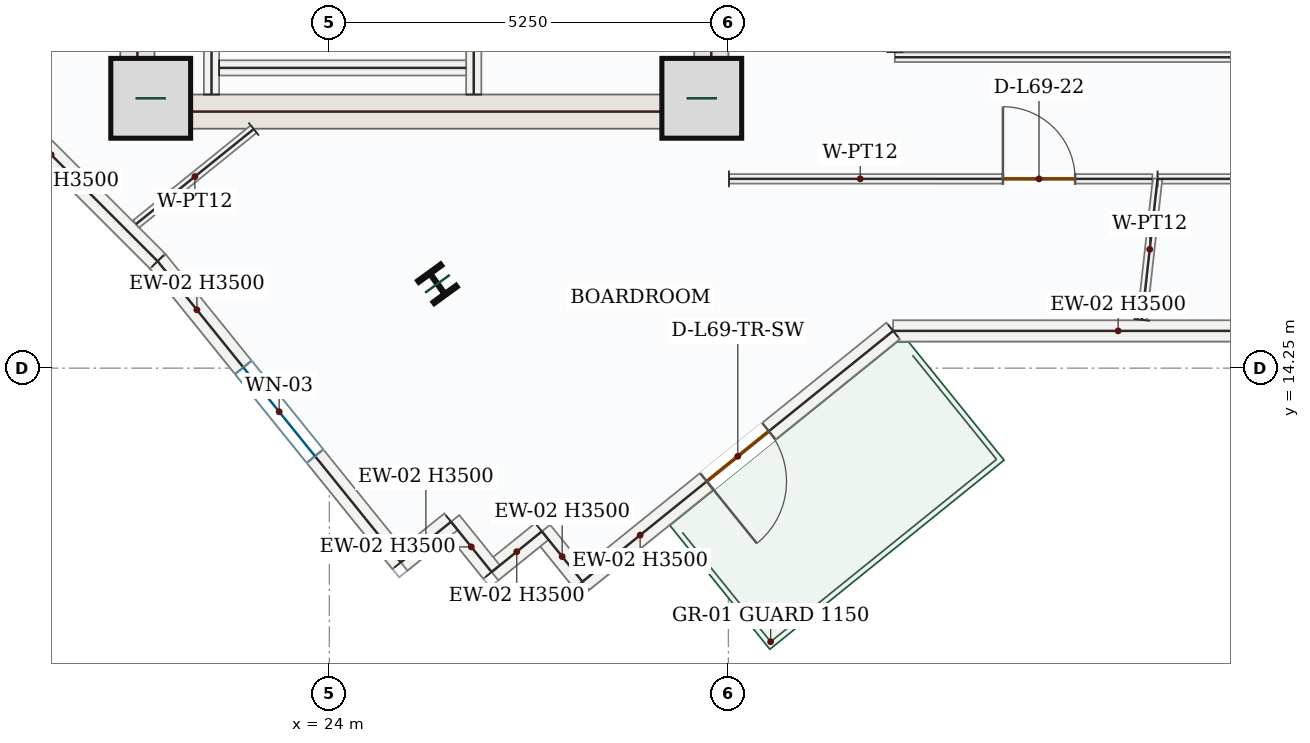
"""IFC4 building model, lengths in metres.
Left out: names, types, materials, properties, quantities, classifications, styles, units other than length and angle.
Written with IfcOpenShell. Run it as: python <this file> out.ifc"""

import sys

from ifc_helpers import new_model, si_unit, direction, frame, frame_2d, origin, origin_2d, place, context, subcontext, project, spatial, rectangle, i_section, extrude, source, transform, mapped, element, fill, save


model = new_model("IFC4")
c1 = context("Model", 3, precision=1e-05, world=origin(), true_north=direction((0.0, 1.0)))
c2 = subcontext(c1, "Body", "Model", "MODEL_VIEW")
j1 = project(units=[si_unit("LENGTHUNIT", "METRE"), si_unit("PLANEANGLEUNIT", "RADIAN")], contexts=[c1])
p1 = place(None, origin())
s1 = spatial("IfcSite", under=j1, at=p1, CompositionType="ELEMENT")
p2 = place(p1, origin())
s2 = spatial("IfcBuilding", under=s1, at=p2, CompositionType="ELEMENT")
p3 = place(p2, frame((0.0, 0.0, 287.85)))
s3 = spatial("IfcBuildingStorey", under=s2, at=p3, CompositionType="ELEMENT", Elevation=287.85)
m1 = source(origin(), c2, "Body", "SweptSolid", [
    extrude(rectangle(XDim=8.55, YDim=0.45, at=frame_2d((4.275, 0.0))), origin(), (0.0, 0.0, 1.0), 3.5),
])
p4 = place(p3, frame((21.475, 17.4, 0.0), z_axis=(0.0, 0.0, 1.0), x_axis=(0.0, 1.0, 0.0)))
e1 = element("IfcWall", 1, at=p4, inside=s3, PredefinedType="SHEAR", context=c2, shape_type="MappedRepresentation", body=[
    mapped(m1, transform((0.0, 0.0, 0.0), x_axis=(1.0, 0.0, 0.0), y_axis=(0.0, 1.0, 0.0), z_axis=(0.0, 0.0, 1.0), scale=1.0)),
])
p5 = place(p3, frame((29.025, 17.4, 0.0), z_axis=(0.0, 0.0, 1.0), x_axis=(0.0, 1.0, 0.0)))
e2 = element("IfcWall", 2, at=p5, inside=s3, PredefinedType="SHEAR", context=c2, shape_type="SweptSolid", body=[
    extrude(rectangle(XDim=8.55, YDim=0.45, at=frame_2d((4.275, 0.0))), origin(), (0.0, 0.0, 1.0), 3.5),
])
p6 = place(p5, frame((6.65, 0.0, 0.0)))
e3 = element("IfcOpeningElement", 3, at=p6, cuts=e2, PredefinedType="OPENING", context=c2, shape_type="SweptSolid", body=[
    extrude(rectangle(XDim=1.1, YDim=2.2, at=frame_2d((0.55, 1.1))), frame((0.0, 0.235, 0.0), z_axis=(0.0, -1.0, 0.0), x_axis=(1.0, 0.0, 0.0)), (0.0, 0.0, 1.0), 0.47),
])
p7 = place(p5, frame((3.15, 0.0, 0.0)))
e4 = element("IfcOpeningElement", 4, at=p7, cuts=e2, PredefinedType="OPENING", context=c2, shape_type="SweptSolid", body=[
    extrude(rectangle(XDim=0.88, YDim=2.1, at=frame_2d((0.44, 1.05))), frame((0.0, 0.235, 0.0), z_axis=(0.0, -1.0, 0.0), x_axis=(1.0, 0.0, 0.0)), (0.0, 0.0, 1.0), 0.47),
])
m2 = source(origin(), c2, "Body", "SweptSolid", [
    extrude(rectangle(XDim=7.1, YDim=0.45, at=frame_2d((3.55, 0.0))), origin(), (0.0, 0.0, 1.0), 3.5),
])
p8 = place(p3, frame((21.7, 17.625, 0.0), z_axis=(0.0, 0.0, 1.0), x_axis=(1.0, 0.0, 0.0)))
e5 = element("IfcWall", 5, at=p8, inside=s3, PredefinedType="SHEAR", context=c2, shape_type="MappedRepresentation", body=[
    mapped(m2, transform((0.0, 0.0, 0.0), x_axis=(1.0, 0.0, 0.0), y_axis=(0.0, 1.0, 0.0), z_axis=(0.0, 0.0, 1.0), scale=1.0)),
])
m3 = source(origin(), c2, "Body", "SweptSolid", [
    extrude(rectangle(XDim=1.05, YDim=1.05, at=origin_2d()), origin(), (0.0, 0.0, 1.0), 3.75),
])
for number, where, z_axis, x_axis in (
    (6, (21.65, 17.8, 0.0), (0.0, 0.0, 1.0), (1.0, 0.0, 0.0)),
    (7, (28.9, 17.8, 0.0), (0.0, 0.0, 1.0), (1.0, 0.0, 0.0)),
):
    element("IfcColumn", number, at=place(p3, frame(where, z_axis=z_axis, x_axis=x_axis)), inside=s3, PredefinedType="COLUMN", context=c2, shape_type="MappedRepresentation", body=[
        mapped(m3, transform((0.0, 0.0, 0.0), x_axis=(1.0, 0.0, 0.0), y_axis=(0.0, 1.0, 0.0), z_axis=(0.0, 0.0, 1.0), scale=1.0)),
    ])
m4 = source(origin(), c2, "Body", "SweptSolid", [
    extrude(i_section(OverallWidth=0.374, OverallDepth=0.372, WebThickness=0.016, FlangeThickness=0.026, FilletRadius=0.018, at=origin_2d()), origin(), (0.0, 0.0, 1.0), 3.75),
])
p9 = place(p3, frame((25.422, 15.359, 0.0), z_axis=(0.0, 0.0, 1.0), x_axis=(0.809016994375, 0.587785252292, 0.0)))
e8 = element("IfcColumn", 8, at=p9, inside=s3, PredefinedType="COLUMN", context=c2, shape_type="MappedRepresentation", body=[
    mapped(m4, transform((0.0, 0.0, 0.0), x_axis=(1.0, 0.0, 0.0), y_axis=(0.0, 1.0, 0.0), z_axis=(0.0, 0.0, 1.0), scale=1.0)),
])
m5 = source(origin(), c2, "Body", "SweptSolid", [
    extrude(rectangle(XDim=5.922, YDim=0.28, at=frame_2d((2.961, 0.0))), origin(), (0.0, 0.0, 1.0), 3.5),
])
p10 = place(p3, frame((37.339, 14.74, 0.0), z_axis=(0.0, 0.0, 1.0), x_axis=(-1.0, 0.0, 0.0)))
e9 = element("IfcWall", 9, at=p10, inside=s3, PredefinedType="SOLIDWALL", context=c2, shape_type="MappedRepresentation", body=[
    mapped(m5, transform((0.0, 0.0, 0.0), x_axis=(1.0, 0.0, 0.0), y_axis=(0.0, 1.0, 0.0), z_axis=(0.0, 0.0, 1.0), scale=1.0)),
])
p11 = place(p3, frame((31.417, 14.74, 0.0), z_axis=(0.0, 0.0, 1.0), x_axis=(-0.778072238875, -0.628174809342, 0.0)))
e10 = element("IfcWall", 10, at=p11, inside=s3, PredefinedType="SOLIDWALL", context=c2, shape_type="SweptSolid", body=[
    extrude(rectangle(XDim=5.253, YDim=0.28, at=frame_2d((2.626, 0.0))), origin(), (0.0, 0.0, 1.0), 3.5),
])
p12 = place(p11, frame((2.101, 0.0, 0.0)))
e11 = element("IfcOpeningElement", 11, at=p12, cuts=e10, PredefinedType="OPENING", context=c2, shape_type="SweptSolid", body=[
    extrude(rectangle(XDim=1.05, YDim=2.15, at=frame_2d((0.525, 1.075))), frame((0.0, 0.15, 0.0), z_axis=(0.0, -1.0, 0.0), x_axis=(1.0, 0.0, 0.0)), (0.0, 0.0, 1.0), 0.3),
])
m6 = source(origin(), c2, "Body", "SweptSolid", [
    extrude(rectangle(XDim=0.85, YDim=0.28, at=frame_2d((0.425, 0.0))), origin(), (0.0, 0.0, 1.0), 3.5),
])
p13 = place(p3, frame((27.33, 11.44, 0.0), z_axis=(0.0, 0.0, 1.0), x_axis=(-0.628156579423, 0.778086956405, 0.0)))
e12 = element("IfcWall", 12, at=p13, inside=s3, PredefinedType="SOLIDWALL", context=c2, shape_type="MappedRepresentation", body=[
    mapped(m6, transform((0.0, 0.0, 0.0), x_axis=(1.0, 0.0, 0.0), y_axis=(0.0, 1.0, 0.0), z_axis=(0.0, 0.0, 1.0), scale=1.0)),
])
m7 = source(origin(), c2, "Body", "SweptSolid", [
    extrude(rectangle(XDim=0.85, YDim=0.28, at=frame_2d((0.425, 0.0))), origin(), (0.0, 0.0, 1.0), 3.5),
])
p14 = place(p3, frame((26.796, 12.102, 0.0), z_axis=(0.0, 0.0, 1.0), x_axis=(-0.777973585776, -0.628296983786, 0.0)))
e13 = element("IfcWall", 13, at=p14, inside=s3, PredefinedType="SOLIDWALL", context=c2, shape_type="MappedRepresentation", body=[
    mapped(m7, transform((0.0, 0.0, 0.0), x_axis=(1.0, 0.0, 0.0), y_axis=(0.0, 1.0, 0.0), z_axis=(0.0, 0.0, 1.0), scale=1.0)),
])
p15 = place(p3, frame((26.135, 11.568, 0.0), z_axis=(0.0, 0.0, 1.0), x_axis=(-0.628330422687, 0.777946579095, 0.0)))
e14 = element("IfcWall", 14, at=p15, inside=s3, PredefinedType="SOLIDWALL", context=c2, shape_type="MappedRepresentation", body=[
    mapped(m6, transform((0.0, 0.0, 0.0), x_axis=(1.0, 0.0, 0.0), y_axis=(0.0, 1.0, 0.0), z_axis=(0.0, 0.0, 1.0), scale=1.0)),
])
p16 = place(p3, frame((25.601, 12.229, 0.0), z_axis=(0.0, 0.0, 1.0), x_axis=(-0.777973585776, -0.628296983786, 0.0)))
e15 = element("IfcWall", 15, at=p16, inside=s3, PredefinedType="SOLIDWALL", context=c2, shape_type="MappedRepresentation", body=[
    mapped(m7, transform((0.0, 0.0, 0.0), x_axis=(1.0, 0.0, 0.0), y_axis=(0.0, 1.0, 0.0), z_axis=(0.0, 0.0, 1.0), scale=1.0)),
])
p17 = place(p3, frame((24.94, 11.695, 0.0), z_axis=(0.0, 0.0, 1.0), x_axis=(-0.628225517447, 0.778031297075, 0.0)))
e16 = element("IfcWall", 16, at=p17, inside=s3, PredefinedType="SOLIDWALL", context=c2, shape_type="SweptSolid", body=[
    extrude(rectangle(XDim=5.093, YDim=0.28, at=frame_2d((2.546, 0.0))), origin(), (0.0, 0.0, 1.0), 3.5),
])
p18 = place(p17, frame((1.796, 0.0, 0.85)))
e17 = element("IfcOpeningElement", 17, at=p18, cuts=e16, PredefinedType="OPENING", context=c2, shape_type="SweptSolid", body=[
    extrude(rectangle(XDim=1.5, YDim=1.5, at=frame_2d((0.75, 0.75))), frame((0.0, 0.15, 0.0), z_axis=(0.0, -1.0, 0.0), x_axis=(1.0, 0.0, 0.0)), (0.0, 0.0, 1.0), 0.3),
])
m8 = source(origin(), c2, "Body", "SweptSolid", [
    extrude(rectangle(XDim=3.96, YDim=0.28, at=frame_2d((1.98, 0.0))), origin(), (0.0, 0.0, 1.0), 3.5),
])
p19 = place(p3, frame((21.74, 15.658, 0.0), z_axis=(0.0, 0.0, 1.0), x_axis=(-0.707106781187, 0.707106781187, 0.0)))
e18 = element("IfcWall", 18, at=p19, inside=s3, PredefinedType="SOLIDWALL", context=c2, shape_type="MappedRepresentation", body=[
    mapped(m8, transform((0.0, 0.0, 0.0), x_axis=(1.0, 0.0, 0.0), y_axis=(0.0, 1.0, 0.0), z_axis=(0.0, 0.0, 1.0), scale=1.0)),
])
m9 = source(origin(), c2, "Body", "SweptSolid", [
    extrude(rectangle(XDim=7.87, YDim=0.2, at=frame_2d((3.935, 0.0))), origin(), (0.0, 0.0, 1.0), 3.5),
])
p20 = place(p3, frame((22.45, 17.85, 0.0), z_axis=(0.0, 0.0, 1.0), x_axis=(0.0, 1.0, 0.0)))
e19 = element("IfcWall", 19, at=p20, inside=s3, PredefinedType="SOLIDWALL", context=c2, shape_type="MappedRepresentation", body=[
    mapped(m9, transform((0.0, 0.0, 0.0), x_axis=(1.0, 0.0, 0.0), y_axis=(0.0, 1.0, 0.0), z_axis=(0.0, 0.0, 1.0), scale=1.0)),
])
p21 = place(p3, frame((25.9, 17.85, 0.0), z_axis=(0.0, 0.0, 1.0), x_axis=(0.0, 1.0, 0.0)))
e20 = element("IfcWall", 20, at=p21, inside=s3, PredefinedType="SOLIDWALL", context=c2, shape_type="SweptSolid", body=[
    extrude(rectangle(XDim=8.0, YDim=0.2, at=frame_2d((4.0, 0.0))), origin(), (0.0, 0.0, 1.0), 3.5),
])
p22 = place(p21, frame((6.2, 0.0, 0.0)))
e21 = element("IfcOpeningElement", 21, at=p22, cuts=e20, PredefinedType="OPENING", context=c2, shape_type="SweptSolid", body=[
    extrude(rectangle(XDim=1.0, YDim=2.15, at=frame_2d((0.5, 1.075))), frame((0.0, 0.11, 0.0), z_axis=(0.0, -1.0, 0.0), x_axis=(1.0, 0.0, 0.0)), (0.0, 0.0, 1.0), 0.22),
])
p23 = place(p21, frame((0.6, 0.0, 0.0)))
e22 = element("IfcOpeningElement", 22, at=p23, cuts=e20, PredefinedType="OPENING", context=c2, shape_type="SweptSolid", body=[
    extrude(rectangle(XDim=0.88, YDim=2.1, at=frame_2d((0.44, 1.05))), frame((0.0, 0.11, 0.0), z_axis=(0.0, -1.0, 0.0), x_axis=(1.0, 0.0, 0.0)), (0.0, 0.0, 1.0), 0.22),
])
m10 = source(origin(), c2, "Body", "SweptSolid", [
    extrude(rectangle(XDim=3.25, YDim=0.2, at=frame_2d((1.625, 0.0))), origin(), (0.0, 0.0, 1.0), 3.5),
])
p24 = place(p3, frame((22.55, 18.2, 0.0), z_axis=(0.0, 0.0, 1.0), x_axis=(1.0, 0.0, 0.0)))
e23 = element("IfcWall", 23, at=p24, inside=s3, PredefinedType="SOLIDWALL", context=c2, shape_type="MappedRepresentation", body=[
    mapped(m10, transform((0.0, 0.0, 0.0), x_axis=(1.0, 0.0, 0.0), y_axis=(0.0, 1.0, 0.0), z_axis=(0.0, 0.0, 1.0), scale=1.0)),
])
m11 = source(origin(), c2, "Body", "SweptSolid", [
    extrude(rectangle(XDim=1.989, YDim=0.125, at=frame_2d((0.995, 0.0))), origin(), (0.0, 0.0, 1.0), 3.5),
])
p25 = place(p3, frame((23.005, 17.395, 0.0), z_axis=(0.0, 0.0, 1.0), x_axis=(-0.778058853423, -0.628191388519, 0.0)))
e24 = element("IfcWall", 24, at=p25, inside=s3, PredefinedType="PARTITIONING", context=c2, shape_type="MappedRepresentation", body=[
    mapped(m11, transform((0.0, 0.0, 0.0), x_axis=(1.0, 0.0, 0.0), y_axis=(0.0, 1.0, 0.0), z_axis=(0.0, 0.0, 1.0), scale=1.0)),
])
p26 = place(p3, frame((34.896, 16.74, 0.0), z_axis=(0.0, 0.0, 1.0), x_axis=(1.0, 0.0, 0.0)))
e25 = element("IfcWall", 25, at=p26, inside=s3, PredefinedType="PARTITIONING", context=c2, shape_type="SweptSolid", body=[
    extrude(rectangle(XDim=6.727, YDim=0.125, at=frame_2d((3.364, 0.0))), origin(), (0.0, 0.0, 1.0), 3.5),
])
p27 = place(p26, frame((1.271, 0.0, 0.0)))
e26 = element("IfcOpeningElement", 26, at=p27, cuts=e25, PredefinedType="OPENING", context=c2, shape_type="SweptSolid", body=[
    extrude(rectangle(XDim=0.95, YDim=2.15, at=frame_2d((0.475, 1.075))), frame((0.0, 0.073, 0.0), z_axis=(0.0, -1.0, 0.0), x_axis=(1.0, 0.0, 0.0)), (0.0, 0.0, 1.0), 0.145),
])
m12 = source(origin(), c2, "Body", "SweptSolid", [
    extrude(rectangle(XDim=1.866, YDim=0.125, at=frame_2d((0.933, 0.0))), origin(), (0.0, 0.0, 1.0), 3.5),
])
p28 = place(p3, frame((34.69, 14.885, 0.0), z_axis=(0.0, 0.0, 1.0), x_axis=(0.110661229882, 0.993858185156, 0.0)))
e27 = element("IfcWall", 27, at=p28, inside=s3, PredefinedType="PARTITIONING", context=c2, shape_type="MappedRepresentation", body=[
    mapped(m12, transform((0.0, 0.0, 0.0), x_axis=(1.0, 0.0, 0.0), y_axis=(0.0, 1.0, 0.0), z_axis=(0.0, 0.0, 1.0), scale=1.0)),
])
p29 = place(p3, frame((29.258, 16.74, 0.0), z_axis=(0.0, 0.0, 1.0), x_axis=(0.99999999904, -4.382505e-05, 0.0)))
e28 = element("IfcWall", 28, at=p29, inside=s3, PredefinedType="PARTITIONING", context=c2, shape_type="SweptSolid", body=[
    extrude(rectangle(XDim=5.571, YDim=0.125, at=frame_2d((2.785, 0.0))), origin(), (0.0, 0.0, 1.0), 3.5),
])
p30 = place(p29, frame((3.604, 0.0, 0.0)))
e29 = element("IfcOpeningElement", 29, at=p30, cuts=e28, PredefinedType="OPENING", context=c2, shape_type="SweptSolid", body=[
    extrude(rectangle(XDim=0.95, YDim=2.15, at=frame_2d((0.475, 1.075))), frame((0.0, 0.073, 0.0), z_axis=(0.0, -1.0, 0.0), x_axis=(1.0, 0.0, 0.0)), (0.0, 0.0, 1.0), 0.145),
])
m13 = source(origin(), c2, "Body", "SweptSolid", [
    extrude(rectangle(XDim=9.12, YDim=0.125, at=frame_2d((4.56, 0.0))), origin(), (0.0, 0.0, 1.0), 3.5),
])
p31 = place(p3, frame((40.56, 18.34, 0.0), z_axis=(0.0, 0.0, 1.0), x_axis=(-1.0, 0.0, 0.0)))
e30 = element("IfcWall", 30, at=p31, inside=s3, PredefinedType="PARTITIONING", context=c2, shape_type="MappedRepresentation", body=[
    mapped(m13, transform((0.0, 0.0, 0.0), x_axis=(1.0, 0.0, 0.0), y_axis=(0.0, 1.0, 0.0), z_axis=(0.0, 0.0, 1.0), scale=1.0)),
])
m14 = source(origin(), c2, "Body", "SweptSolid", [
    extrude(rectangle(XDim=1.05, YDim=2.15, at=frame_2d((0.525, 1.075))), frame((0.0, 0.025, 0.0), z_axis=(0.0, -1.0, 0.0), x_axis=(1.0, 0.0, 0.0)), (0.0, 0.0, 1.0), 0.05),
])
p32 = place(p12, origin())
e31 = element("IfcDoor", 31, at=p32, inside=s3, OperationType="SINGLE_SWING_RIGHT", PredefinedType="DOOR", context=c2, shape_type="MappedRepresentation", body=[
    mapped(m14, transform((0.0, 0.0, 0.0), x_axis=(1.0, 0.0, 0.0), y_axis=(0.0, 1.0, 0.0), z_axis=(0.0, 0.0, 1.0), scale=1.0)),
])
fill(e11, e31)
m15 = source(origin(), c2, "Body", "SweptSolid", [
    extrude(rectangle(XDim=1.5, YDim=1.5, at=frame_2d((0.75, 0.75))), frame((0.0, 0.03, 0.0), z_axis=(0.0, -1.0, 0.0), x_axis=(1.0, 0.0, 0.0)), (0.0, 0.0, 1.0), 0.06),
])
p33 = place(p18, origin())
e32 = element("IfcWindow", 32, at=p33, inside=s3, PartitioningType="SINGLE_PANEL", PredefinedType="WINDOW", context=c2, shape_type="MappedRepresentation", body=[
    mapped(m15, transform((0.0, 0.0, 0.0), x_axis=(1.0, 0.0, 0.0), y_axis=(0.0, 1.0, 0.0), z_axis=(0.0, 0.0, 1.0), scale=1.0)),
])
fill(e17, e32)
m16 = source(origin(), c2, "Body", "SweptSolid", [
    extrude(rectangle(XDim=0.95, YDim=2.15, at=frame_2d((0.475, 1.075))), frame((0.0, 0.025, 0.0), z_axis=(0.0, -1.0, 0.0), x_axis=(1.0, 0.0, 0.0)), (0.0, 0.0, 1.0), 0.05),
])
p34 = place(p30, origin())
e33 = element("IfcDoor", 33, at=p34, inside=s3, OperationType="SINGLE_SWING_LEFT", PredefinedType="DOOR", context=c2, shape_type="MappedRepresentation", body=[
    mapped(m16, transform((0.0, 0.0, 0.0), x_axis=(1.0, 0.0, 0.0), y_axis=(0.0, 1.0, 0.0), z_axis=(0.0, 0.0, 1.0), scale=1.0)),
])
fill(e29, e33)
save(model, sys.argv[1])
